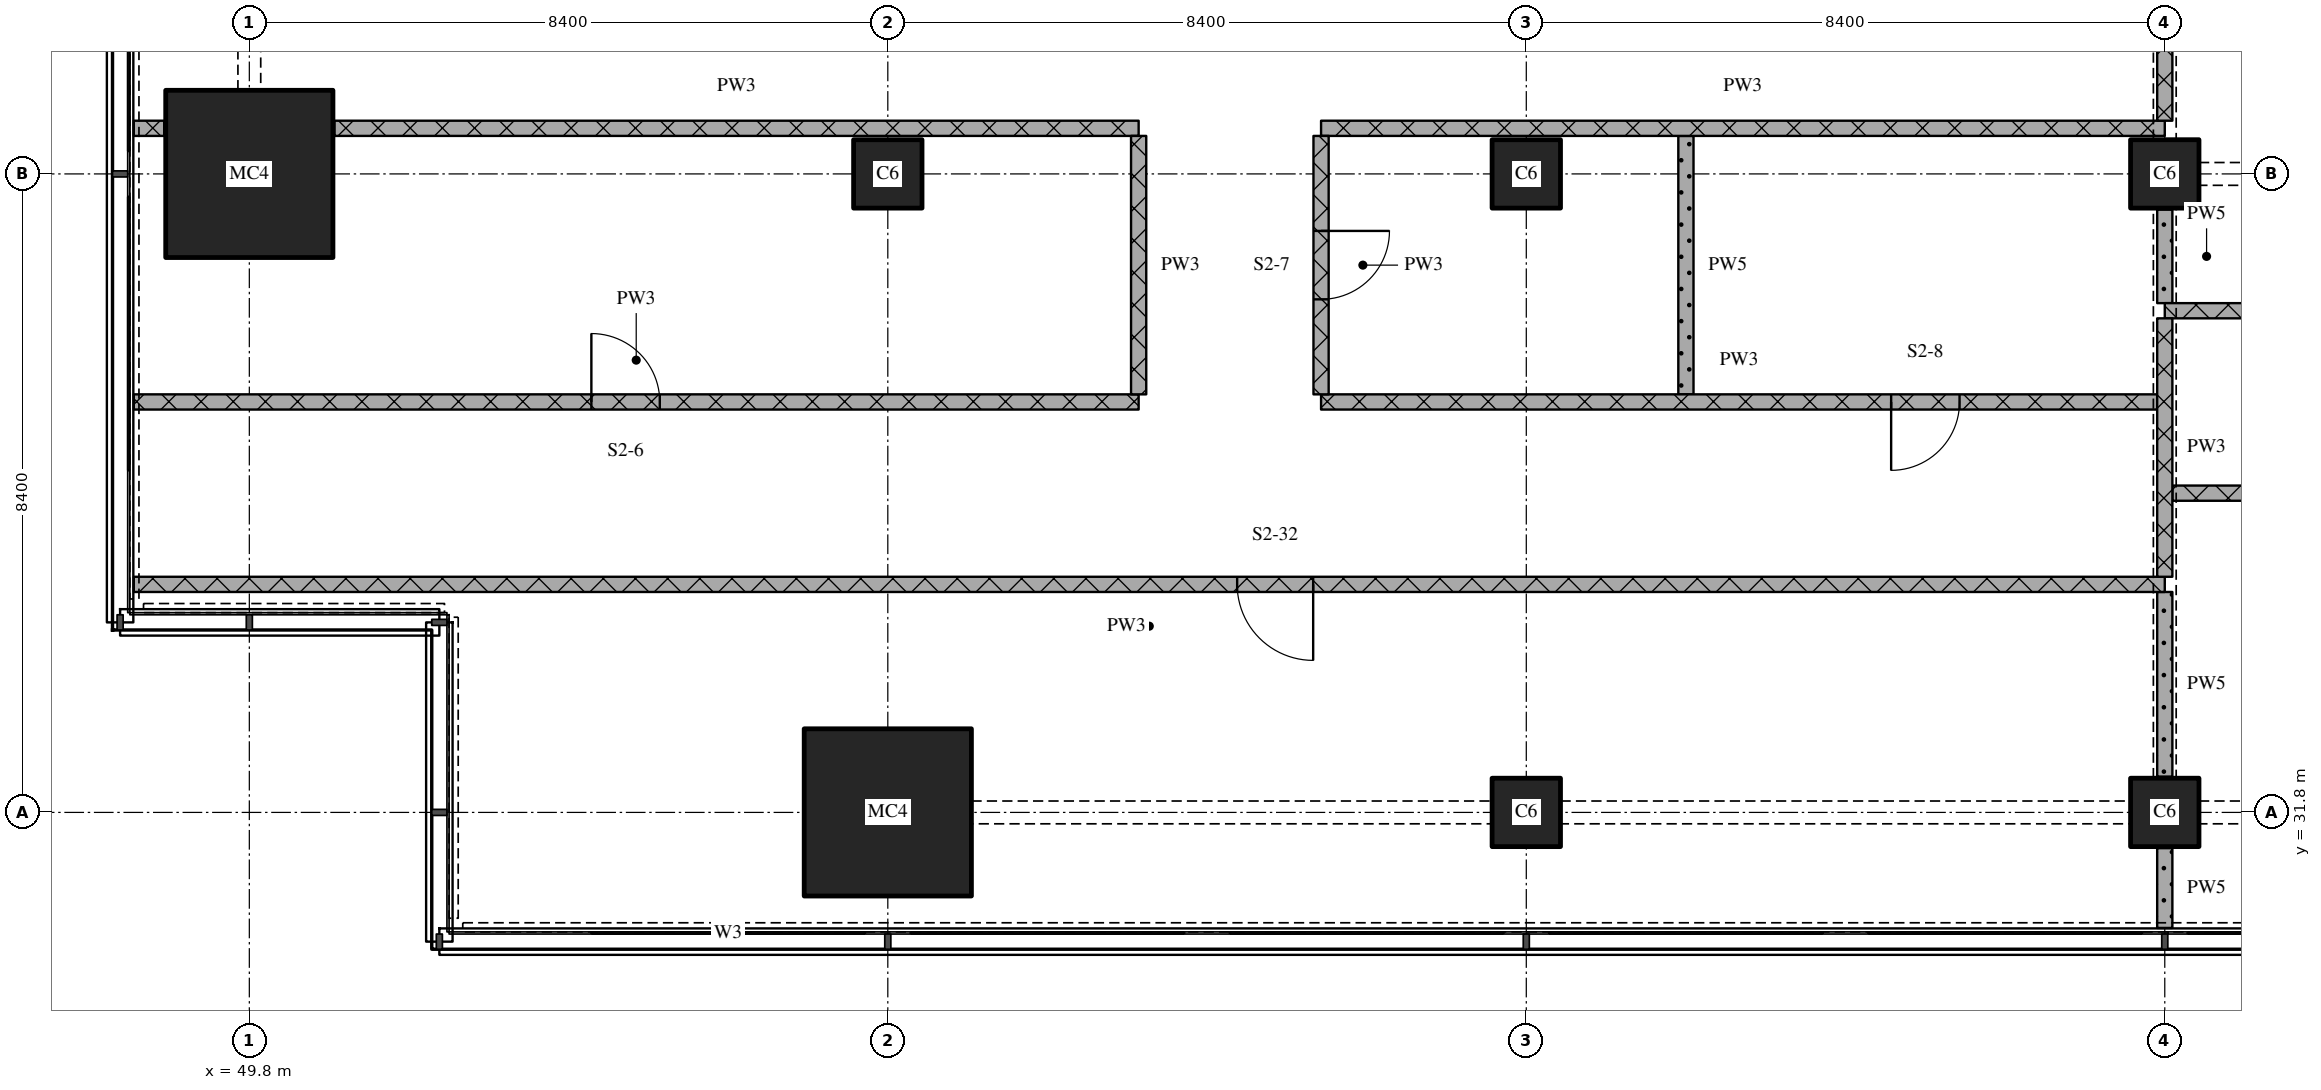
"""IFC4 building model, lengths in metres.
Left out: names, types, materials, properties, quantities, classifications, styles, units other than length and angle.
Written with IfcOpenShell. Run it as: python <this file> out.ifc"""

import sys

from ifc_helpers import new_model, si_unit, direction, frame, frame_2d, origin, origin_2d, place, context, subcontext, project, spatial, rectangle, extrude, element, fill, save


model = new_model("IFC4")
c1 = context("Model", 3, precision=1e-05, world=origin(), true_north=direction((0.0, 1.0)))
c2 = subcontext(c1, "Body", "Model", "MODEL_VIEW")
j1 = project(units=[si_unit("LENGTHUNIT", "METRE"), si_unit("PLANEANGLEUNIT", "RADIAN")], contexts=[c1])
p1 = place(None, origin())
s1 = spatial("IfcSite", under=j1, at=p1, CompositionType="ELEMENT")
p2 = place(p1, origin())
s2 = spatial("IfcBuilding", under=s1, at=p2, CompositionType="ELEMENT")
p3 = place(p2, frame((0.0, 0.0, 28.2)))
s3 = spatial("IfcBuildingStorey", under=s2, at=p3, CompositionType="ELEMENT", Elevation=28.2)
for number, where, z_axis, x_axis in (
    (1, (49.8, 40.2, 0.0), (0.0, 0.0, 1.0), (1.0, 0.0, 0.0)),
    (2, (58.2, 31.8, 0.0), (0.0, 0.0, 1.0), (1.0, 0.0, 0.0)),
):
    element("IfcColumn", number, at=place(p3, frame(where, z_axis=z_axis, x_axis=x_axis)), inside=s3, PredefinedType="COLUMN", context=c2, shape_type="SweptSolid", body=[
        extrude(rectangle(XDim=2.2, YDim=2.2, at=origin_2d()), origin(), (0.0, 0.0, 1.0), 4.5),
    ])
for number, where, z_axis, x_axis in (
    (3, (58.2, 40.2, 0.0), (0.0, 0.0, 1.0), (1.0, 0.0, 0.0)),
    (4, (66.6, 31.8, 0.0), (0.0, 0.0, 1.0), (1.0, 0.0, 0.0)),
    (5, (66.6, 40.2, 0.0), (0.0, 0.0, 1.0), (1.0, 0.0, 0.0)),
    (6, (75.0, 31.8, 0.0), (0.0, 0.0, 1.0), (1.0, 0.0, 0.0)),
    (7, (75.0, 40.2, 0.0), (0.0, 0.0, 1.0), (1.0, 0.0, 0.0)),
):
    element("IfcColumn", number, at=place(p3, frame(where, z_axis=z_axis, x_axis=x_axis)), inside=s3, PredefinedType="COLUMN", context=c2, shape_type="SweptSolid", body=[
        extrude(rectangle(XDim=0.9, YDim=0.9, at=origin_2d()), origin(), (0.0, 0.0, 1.0), 4.5),
    ])
p4 = place(p3, frame((75.0, 34.8, 0.0), z_axis=(0.0, 0.0, 1.0), x_axis=(-1.0, 0.0, 0.0)))
e8 = element("IfcWall", 8, at=p4, inside=s3, PredefinedType="PARTITIONING", context=c2, shape_type="SweptSolid", body=[
    extrude(rectangle(XDim=26.72, YDim=0.2, at=frame_2d((13.36, 0.0))), origin(), (0.0, 0.0, 1.0), 4.2),
])
p5 = place(p4, frame((11.204, 0.0, 0.0)))
e9 = element("IfcOpeningElement", 9, at=p5, cuts=e8, PredefinedType="OPENING", context=c2, shape_type="SweptSolid", body=[
    extrude(rectangle(XDim=1.0, YDim=2.1, at=frame_2d((0.5, 1.05))), frame((0.0, 0.11, 0.0), z_axis=(0.0, -1.0, 0.0), x_axis=(1.0, 0.0, 0.0)), (0.0, 0.0, 1.0), 0.22),
])
p6 = place(p3, frame((100.1, 36.0, 0.0), z_axis=(0.0, 0.0, 1.0), x_axis=(-1.0, 0.0, 0.0)))
e10 = element("IfcWall", 10, at=p6, inside=s3, PredefinedType="PARTITIONING", context=c2, shape_type="SweptSolid", body=[
    extrude(rectangle(XDim=25.0, YDim=0.2, at=frame_2d((12.5, 0.0))), origin(), (0.0, 0.0, 1.0), 4.2),
])
p7 = place(p6, frame((12.0, 0.0, 0.0)))
e11 = element("IfcOpeningElement", 11, at=p7, cuts=e10, PredefinedType="OPENING", context=c2, shape_type="SweptSolid", body=[
    extrude(rectangle(XDim=1.0, YDim=2.1, at=frame_2d((0.5, 1.05))), frame((0.0, 0.11, 0.0), z_axis=(0.0, -1.0, 0.0), x_axis=(1.0, 0.0, 0.0)), (0.0, 0.0, 1.0), 0.22),
])
p8 = place(p3, frame((48.28, 37.2, 0.0), z_axis=(0.0, 0.0, 1.0), x_axis=(1.0, 0.0, 0.0)))
e12 = element("IfcWall", 12, at=p8, inside=s3, PredefinedType="PARTITIONING", context=c2, shape_type="SweptSolid", body=[
    extrude(rectangle(XDim=13.22, YDim=0.2, at=frame_2d((6.61, 0.0))), origin(), (0.0, 0.0, 1.0), 4.2),
])
p9 = place(p8, frame((6.02, 0.0, 0.0)))
e13 = element("IfcOpeningElement", 13, at=p9, cuts=e12, PredefinedType="OPENING", context=c2, shape_type="SweptSolid", body=[
    extrude(rectangle(XDim=0.9, YDim=2.1, at=frame_2d((0.45, 1.05))), frame((0.0, 0.11, 0.0), z_axis=(0.0, -1.0, 0.0), x_axis=(1.0, 0.0, 0.0)), (0.0, 0.0, 1.0), 0.22),
])
p10 = place(p3, frame((63.9, 37.2, 0.0), z_axis=(0.0, 0.0, 1.0), x_axis=(1.0, 0.0, 0.0)))
e14 = element("IfcWall", 14, at=p10, inside=s3, PredefinedType="PARTITIONING", context=c2, shape_type="SweptSolid", body=[
    extrude(rectangle(XDim=11.0, YDim=0.2, at=frame_2d((5.5, 0.0))), origin(), (0.0, 0.0, 1.0), 4.2),
])
p11 = place(p10, frame((7.5, 0.0, 0.0)))
e15 = element("IfcOpeningElement", 15, at=p11, cuts=e14, PredefinedType="OPENING", context=c2, shape_type="SweptSolid", body=[
    extrude(rectangle(XDim=0.9, YDim=2.1, at=frame_2d((0.45, 1.05))), frame((0.0, 0.11, 0.0), z_axis=(0.0, -1.0, 0.0), x_axis=(1.0, 0.0, 0.0)), (0.0, 0.0, 1.0), 0.22),
])
p12 = place(p3, frame((75.0, 38.4, 0.0), z_axis=(0.0, 0.0, 1.0), x_axis=(1.0, 0.0, 0.0)))
e16 = element("IfcWall", 16, at=p12, inside=s3, PredefinedType="PARTITIONING", context=c2, shape_type="SweptSolid", body=[
    extrude(rectangle(XDim=11.4, YDim=0.2, at=frame_2d((5.7, 0.0))), origin(), (0.0, 0.0, 1.0), 4.2),
])
p13 = place(p12, frame((1.35, 0.0, 0.0)))
e17 = element("IfcOpeningElement", 17, at=p13, cuts=e16, PredefinedType="OPENING", context=c2, shape_type="SweptSolid", body=[
    extrude(rectangle(XDim=0.9, YDim=2.1, at=frame_2d((0.45, 1.05))), frame((0.0, 0.11, 0.0), z_axis=(0.0, -1.0, 0.0), x_axis=(1.0, 0.0, 0.0)), (0.0, 0.0, 1.0), 0.22),
])
p14 = place(p12, frame((4.65, 0.0, 0.0)))
e18 = element("IfcOpeningElement", 18, at=p14, cuts=e16, PredefinedType="OPENING", context=c2, shape_type="SweptSolid", body=[
    extrude(rectangle(XDim=0.9, YDim=2.1, at=frame_2d((0.45, 1.05))), frame((0.0, 0.11, 0.0), z_axis=(0.0, -1.0, 0.0), x_axis=(1.0, 0.0, 0.0)), (0.0, 0.0, 1.0), 0.22),
])
p15 = place(p12, frame((8.55, 0.0, 0.0)))
e19 = element("IfcOpeningElement", 19, at=p15, cuts=e16, PredefinedType="OPENING", context=c2, shape_type="SweptSolid", body=[
    extrude(rectangle(XDim=0.9, YDim=2.1, at=frame_2d((0.45, 1.05))), frame((0.0, 0.11, 0.0), z_axis=(0.0, -1.0, 0.0), x_axis=(1.0, 0.0, 0.0)), (0.0, 0.0, 1.0), 0.22),
])
p16 = place(p3, frame((48.28, 40.8, 0.0), z_axis=(0.0, 0.0, 1.0), x_axis=(1.0, 0.0, 0.0)))
e20 = element("IfcWall", 20, at=p16, inside=s3, PredefinedType="PARTITIONING", context=c2, shape_type="SweptSolid", body=[
    extrude(rectangle(XDim=0.4, YDim=0.2, at=frame_2d((0.2, 0.0))), origin(), (0.0, 0.0, 1.0), 4.2),
])
p17 = place(p3, frame((50.92, 40.8, 0.0), z_axis=(0.0, 0.0, 1.0), x_axis=(1.0, 0.0, 0.0)))
e21 = element("IfcWall", 21, at=p17, inside=s3, PredefinedType="PARTITIONING", context=c2, shape_type="SweptSolid", body=[
    extrude(rectangle(XDim=10.58, YDim=0.2, at=frame_2d((5.29, 0.0))), origin(), (0.0, 0.0, 1.0), 4.2),
])
p18 = place(p3, frame((63.9, 40.8, 0.0), z_axis=(0.0, 0.0, 1.0), x_axis=(1.0, 0.0, 0.0)))
e22 = element("IfcWall", 22, at=p18, inside=s3, PredefinedType="PARTITIONING", context=c2, shape_type="SweptSolid", body=[
    extrude(rectangle(XDim=11.1, YDim=0.2, at=frame_2d((5.55, 0.0))), origin(), (0.0, 0.0, 1.0), 4.2),
])
p19 = place(p3, frame((61.5, 40.7, 0.0), z_axis=(0.0, 0.0, 1.0), x_axis=(0.0, -1.0, 0.0)))
e23 = element("IfcWall", 23, at=p19, inside=s3, PredefinedType="PARTITIONING", context=c2, shape_type="SweptSolid", body=[
    extrude(rectangle(XDim=3.4, YDim=0.2, at=frame_2d((1.7, 0.0))), origin(), (0.0, 0.0, 1.0), 4.2),
])
p20 = place(p3, frame((63.9, 40.7, 0.0), z_axis=(0.0, 0.0, 1.0), x_axis=(0.0, -1.0, 0.0)))
e24 = element("IfcWall", 24, at=p20, inside=s3, PredefinedType="PARTITIONING", context=c2, shape_type="SweptSolid", body=[
    extrude(rectangle(XDim=3.4, YDim=0.2, at=frame_2d((1.7, 0.0))), origin(), (0.0, 0.0, 1.0), 4.2),
])
p21 = place(p20, frame((1.25, 0.0, 0.0)))
e25 = element("IfcOpeningElement", 25, at=p21, cuts=e24, PredefinedType="OPENING", context=c2, shape_type="SweptSolid", body=[
    extrude(rectangle(XDim=0.9, YDim=2.1, at=frame_2d((0.45, 1.05))), frame((0.0, 0.11, 0.0), z_axis=(0.0, -1.0, 0.0), x_axis=(1.0, 0.0, 0.0)), (0.0, 0.0, 1.0), 0.22),
])
p22 = place(p3, frame((68.7, 40.7, 0.0), z_axis=(0.0, 0.0, 1.0), x_axis=(0.0, -1.0, 0.0)))
e26 = element("IfcWall", 26, at=p22, inside=s3, PredefinedType="PARTITIONING", context=c2, shape_type="SweptSolid", body=[
    extrude(rectangle(XDim=3.4, YDim=0.2, at=frame_2d((1.7, 0.0))), origin(), (0.0, 0.0, 1.0), 4.2),
])
p23 = place(p3, frame((75.0, 38.3, 0.0), z_axis=(0.0, 0.0, 1.0), x_axis=(0.0, -1.0, 0.0)))
e27 = element("IfcWall", 27, at=p23, inside=s3, PredefinedType="PARTITIONING", context=c2, shape_type="SweptSolid", body=[
    extrude(rectangle(XDim=3.4, YDim=0.2, at=frame_2d((1.7, 0.0))), origin(), (0.0, 0.0, 1.0), 3.7),
])
p24 = place(p3, frame((75.0, 43.1, 0.0), z_axis=(0.0, 0.0, 1.0), x_axis=(0.0, -1.0, 0.0)))
e28 = element("IfcWall", 28, at=p24, inside=s3, PredefinedType="PARTITIONING", context=c2, shape_type="SweptSolid", body=[
    extrude(rectangle(XDim=2.2, YDim=0.2, at=frame_2d((1.1, 0.0))), origin(), (0.0, 0.0, 1.0), 3.3),
])
p25 = place(p3, frame((75.0, 31.33, 0.0), z_axis=(0.0, 0.0, 1.0), x_axis=(0.0, -1.0, 0.0)))
e29 = element("IfcWall", 29, at=p25, inside=s3, PredefinedType="PARTITIONING", context=c2, shape_type="SweptSolid", body=[
    extrude(rectangle(XDim=1.05, YDim=0.2, at=frame_2d((0.525, 0.0))), origin(), (0.0, 0.0, 1.0), 4.2),
])
p26 = place(p3, frame((75.0, 34.7, 0.0), z_axis=(0.0, 0.0, 1.0), x_axis=(0.0, -1.0, 0.0)))
e30 = element("IfcWall", 30, at=p26, inside=s3, PredefinedType="PARTITIONING", context=c2, shape_type="SweptSolid", body=[
    extrude(rectangle(XDim=2.43, YDim=0.2, at=frame_2d((1.215, 0.0))), origin(), (0.0, 0.0, 1.0), 3.7),
])
p27 = place(p3, frame((75.0, 39.73, 0.0), z_axis=(0.0, 0.0, 1.0), x_axis=(0.0, -1.0, 0.0)))
e31 = element("IfcWall", 31, at=p27, inside=s3, PredefinedType="PARTITIONING", context=c2, shape_type="SweptSolid", body=[
    extrude(rectangle(XDim=1.23, YDim=0.2, at=frame_2d((0.615, 0.0))), origin(), (0.0, 0.0, 1.0), 3.7),
])
p28 = place(p5, origin())
e32 = element("IfcDoor", 32, at=p28, inside=s3, OperationType="SINGLE_SWING_LEFT", PredefinedType="DOOR", context=c2, shape_type="SweptSolid", body=[
    extrude(rectangle(XDim=1.0, YDim=2.1, at=frame_2d((0.5, 1.05))), frame((0.0, 0.025, 0.0), z_axis=(0.0, -1.0, 0.0), x_axis=(1.0, 0.0, 0.0)), (0.0, 0.0, 1.0), 0.05),
])
fill(e9, e32)
p29 = place(p9, origin())
e33 = element("IfcDoor", 33, at=p29, inside=s3, OperationType="SINGLE_SWING_LEFT", PredefinedType="DOOR", context=c2, shape_type="SweptSolid", body=[
    extrude(rectangle(XDim=0.9, YDim=2.1, at=frame_2d((0.45, 1.05))), frame((0.0, 0.025, 0.0), z_axis=(0.0, -1.0, 0.0), x_axis=(1.0, 0.0, 0.0)), (0.0, 0.0, 1.0), 0.05),
])
fill(e13, e33)
p30 = place(p11, origin())
e34 = element("IfcDoor", 34, at=p30, inside=s3, OperationType="SINGLE_SWING_RIGHT", PredefinedType="DOOR", context=c2, shape_type="SweptSolid", body=[
    extrude(rectangle(XDim=0.9, YDim=2.1, at=frame_2d((0.45, 1.05))), frame((0.0, 0.025, 0.0), z_axis=(0.0, -1.0, 0.0), x_axis=(1.0, 0.0, 0.0)), (0.0, 0.0, 1.0), 0.05),
])
fill(e15, e34)
p31 = place(p21, origin())
e35 = element("IfcDoor", 35, at=p31, inside=s3, OperationType="SINGLE_SWING_LEFT", PredefinedType="DOOR", context=c2, shape_type="SweptSolid", body=[
    extrude(rectangle(XDim=0.9, YDim=2.1, at=frame_2d((0.45, 1.05))), frame((0.0, 0.025, 0.0), z_axis=(0.0, -1.0, 0.0), x_axis=(1.0, 0.0, 0.0)), (0.0, 0.0, 1.0), 0.05),
])
fill(e25, e35)
save(model, sys.argv[1])
